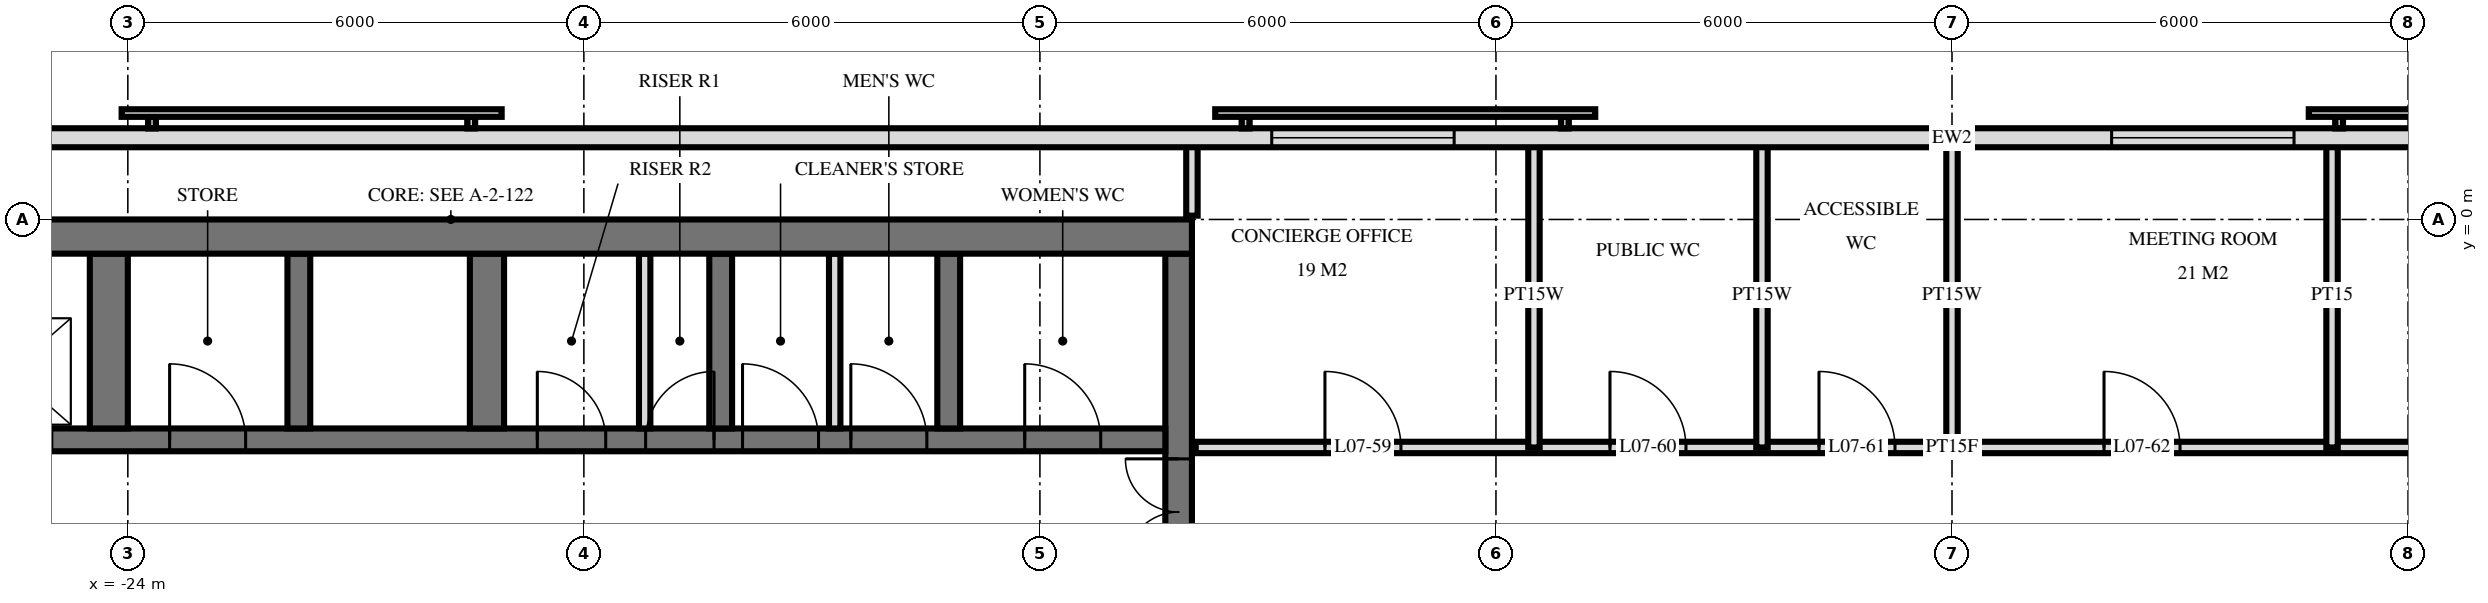
"""IFC4 building model, lengths in metres.
Left out: names, types, materials, properties, quantities, classifications, styles, units other than length and angle.
Written with IfcOpenShell. Run it as: python <this file> out.ifc"""

import sys

from ifc_helpers import new_model, si_unit, direction, frame, frame_2d, origin, place, context, subcontext, project, spatial, rectangle, extrude, element, fill, save


model = new_model("IFC4")
c1 = context("Model", 3, precision=1e-05, world=origin(), true_north=direction((0.0, 1.0)))
c2 = subcontext(c1, "Body", "Model", "MODEL_VIEW")
j1 = project(units=[si_unit("LENGTHUNIT", "METRE"), si_unit("PLANEANGLEUNIT", "RADIAN")], contexts=[c1])
p1 = place(None, origin())
s1 = spatial("IfcSite", under=j1, at=p1, CompositionType="ELEMENT")
p2 = place(p1, origin())
s2 = spatial("IfcBuilding", under=s1, at=p2, CompositionType="ELEMENT")
p3 = place(p2, frame((0.0, 0.0, 34.8)))
s3 = spatial("IfcBuildingStorey", under=s2, at=p3, CompositionType="ELEMENT", Elevation=34.8)
p4 = place(p3, frame((-29.5, -0.225, 0.0), z_axis=(0.0, 0.0, 1.0), x_axis=(1.0, 0.0, 0.0)))
e1 = element("IfcWall", 1, at=p4, inside=s3, PredefinedType="SHEAR", context=c2, shape_type="SweptSolid", body=[
    extrude(rectangle(XDim=19.5, YDim=0.45, at=frame_2d((9.75, 0.0))), origin(), (0.0, 0.0, 1.0), 3.6),
])
p5 = place(p3, frame((-10.175, -14.55, 0.0), z_axis=(0.0, 0.0, 1.0), x_axis=(0.0, 1.0, 0.0)))
e2 = element("IfcWall", 2, at=p5, inside=s3, PredefinedType="SHEAR", context=c2, shape_type="SweptSolid", body=[
    extrude(rectangle(XDim=14.1, YDim=0.35, at=frame_2d((7.05, 0.0))), origin(), (0.0, 0.0, 1.0), 3.6),
])
p6 = place(p5, frame((8.4, 0.0, 0.0)))
e3 = element("IfcOpeningElement", 3, at=p6, cuts=e2, PredefinedType="OPENING", context=c2, shape_type="SweptSolid", body=[
    extrude(rectangle(XDim=1.4, YDim=2.4, at=frame_2d((0.7, 1.2))), frame((0.0, 0.185, 0.0), z_axis=(0.0, -1.0, 0.0), x_axis=(1.0, 0.0, 0.0)), (0.0, 0.0, 1.0), 0.37),
])
p7 = place(p5, frame((10.0, 0.0, 0.0)))
e4 = element("IfcOpeningElement", 4, at=p7, cuts=e2, PredefinedType="OPENING", context=c2, shape_type="SweptSolid", body=[
    extrude(rectangle(XDim=1.4, YDim=2.4, at=frame_2d((0.7, 1.2))), frame((0.0, 0.185, 0.0), z_axis=(0.0, -1.0, 0.0), x_axis=(1.0, 0.0, 0.0)), (0.0, 0.0, 1.0), 0.37),
])
p8 = place(p5, frame((4.0, 0.0, 0.0)))
e5 = element("IfcOpeningElement", 5, at=p8, cuts=e2, PredefinedType="OPENING", context=c2, shape_type="SweptSolid", body=[
    extrude(rectangle(XDim=1.2, YDim=2.1, at=frame_2d((0.6, 1.05))), frame((0.0, 0.185, 0.0), z_axis=(0.0, -1.0, 0.0), x_axis=(1.0, 0.0, 0.0)), (0.0, 0.0, 1.0), 0.37),
])
p9 = place(p3, frame((-29.05, -2.9, 0.0), z_axis=(0.0, 0.0, 1.0), x_axis=(1.0, 0.0, 0.0)))
e6 = element("IfcWall", 6, at=p9, inside=s3, PredefinedType="SHEAR", context=c2, shape_type="SweptSolid", body=[
    extrude(rectangle(XDim=18.7, YDim=0.3, at=frame_2d((9.35, 0.0))), origin(), (0.0, 0.0, 1.0), 3.6),
])
p10 = place(p9, frame((2.95, 0.0, 0.0)))
e7 = element("IfcOpeningElement", 7, at=p10, cuts=e6, PredefinedType="OPENING", context=c2, shape_type="SweptSolid", body=[
    extrude(rectangle(XDim=1.1, YDim=2.1, at=frame_2d((0.55, 1.05))), frame((0.0, 0.16, 0.0), z_axis=(0.0, -1.0, 0.0), x_axis=(1.0, 0.0, 0.0)), (0.0, 0.0, 1.0), 0.32),
])
p11 = place(p9, frame((0.55, 0.0, 0.0)))
e8 = element("IfcOpeningElement", 8, at=p11, cuts=e6, PredefinedType="OPENING", context=c2, shape_type="SweptSolid", body=[
    extrude(rectangle(XDim=1.1, YDim=2.1, at=frame_2d((0.55, 1.05))), frame((0.0, 0.16, 0.0), z_axis=(0.0, -1.0, 0.0), x_axis=(1.0, 0.0, 0.0)), (0.0, 0.0, 1.0), 0.32),
])
p12 = place(p9, frame((11.863, 0.0, 0.0)))
e9 = element("IfcOpeningElement", 9, at=p12, cuts=e6, PredefinedType="OPENING", context=c2, shape_type="SweptSolid", body=[
    extrude(rectangle(XDim=0.9, YDim=2.1, at=frame_2d((0.45, 1.05))), frame((0.0, 0.16, 0.0), z_axis=(0.0, -1.0, 0.0), x_axis=(1.0, 0.0, 0.0)), (0.0, 0.0, 1.0), 0.32),
])
p13 = place(p9, frame((10.438, 0.0, 0.0)))
e10 = element("IfcOpeningElement", 10, at=p13, cuts=e6, PredefinedType="OPENING", context=c2, shape_type="SweptSolid", body=[
    extrude(rectangle(XDim=0.9, YDim=2.1, at=frame_2d((0.45, 1.05))), frame((0.0, 0.16, 0.0), z_axis=(0.0, -1.0, 0.0), x_axis=(1.0, 0.0, 0.0)), (0.0, 0.0, 1.0), 0.32),
])
p14 = place(p9, frame((16.85, 0.0, 0.0)))
e11 = element("IfcOpeningElement", 11, at=p14, cuts=e6, PredefinedType="OPENING", context=c2, shape_type="SweptSolid", body=[
    extrude(rectangle(XDim=1.0, YDim=2.1, at=frame_2d((0.5, 1.05))), frame((0.0, 0.16, 0.0), z_axis=(0.0, -1.0, 0.0), x_axis=(1.0, 0.0, 0.0)), (0.0, 0.0, 1.0), 0.32),
])
p15 = place(p9, frame((14.562, 0.0, 0.0)))
e12 = element("IfcOpeningElement", 12, at=p15, cuts=e6, PredefinedType="OPENING", context=c2, shape_type="SweptSolid", body=[
    extrude(rectangle(XDim=1.0, YDim=2.1, at=frame_2d((0.5, 1.05))), frame((0.0, 0.16, 0.0), z_axis=(0.0, -1.0, 0.0), x_axis=(1.0, 0.0, 0.0)), (0.0, 0.0, 1.0), 0.32),
])
p16 = place(p9, frame((13.137, 0.0, 0.0)))
e13 = element("IfcOpeningElement", 13, at=p16, cuts=e6, PredefinedType="OPENING", context=c2, shape_type="SweptSolid", body=[
    extrude(rectangle(XDim=1.0, YDim=2.1, at=frame_2d((0.5, 1.05))), frame((0.0, 0.16, 0.0), z_axis=(0.0, -1.0, 0.0), x_axis=(1.0, 0.0, 0.0)), (0.0, 0.0, 1.0), 0.32),
])
p17 = place(p9, frame((5.6, 0.0, 0.0)))
e14 = element("IfcOpeningElement", 14, at=p17, cuts=e6, PredefinedType="OPENING", context=c2, shape_type="SweptSolid", body=[
    extrude(rectangle(XDim=1.0, YDim=2.1, at=frame_2d((0.5, 1.05))), frame((0.0, 0.16, 0.0), z_axis=(0.0, -1.0, 0.0), x_axis=(1.0, 0.0, 0.0)), (0.0, 0.0, 1.0), 0.32),
])
for number, where, z_axis, x_axis in (
    (15, (-13.2, -2.75, 0.0), (0.0, 0.0, 1.0), (0.0, 1.0, 0.0)),
    (16, (-16.2, -2.75, 0.0), (0.0, 0.0, 1.0), (0.0, 1.0, 0.0)),
):
    element("IfcWall", number, at=place(p3, frame(where, z_axis=z_axis, x_axis=x_axis)), inside=s3, PredefinedType="SHEAR", context=c2, shape_type="SweptSolid", body=[
        extrude(rectangle(XDim=2.3, YDim=0.3, at=frame_2d((1.15, 0.0))), origin(), (0.0, 0.0, 1.0), 3.6),
    ])
p18 = place(p3, frame((-19.275, -2.75, 0.0), z_axis=(0.0, 0.0, 1.0), x_axis=(0.0, 1.0, 0.0)))
e17 = element("IfcWall", 17, at=p18, inside=s3, PredefinedType="SHEAR", context=c2, shape_type="SweptSolid", body=[
    extrude(rectangle(XDim=2.3, YDim=0.45, at=frame_2d((1.15, 0.0))), origin(), (0.0, 0.0, 1.0), 3.6),
])
p19 = place(p3, frame((-21.75, -2.75, 0.0), z_axis=(0.0, 0.0, 1.0), x_axis=(0.0, 1.0, 0.0)))
e18 = element("IfcWall", 18, at=p19, inside=s3, PredefinedType="SHEAR", context=c2, shape_type="SweptSolid", body=[
    extrude(rectangle(XDim=2.3, YDim=0.3, at=frame_2d((1.15, 0.0))), origin(), (0.0, 0.0, 1.0), 3.6),
])
p20 = place(p3, frame((-24.25, -2.75, 0.0), z_axis=(0.0, 0.0, 1.0), x_axis=(0.0, 1.0, 0.0)))
e19 = element("IfcWall", 19, at=p20, inside=s3, PredefinedType="SHEAR", context=c2, shape_type="SweptSolid", body=[
    extrude(rectangle(XDim=2.3, YDim=0.5, at=frame_2d((1.15, 0.0))), origin(), (0.0, 0.0, 1.0), 3.6),
])
p21 = place(p3, frame((28.775, 1.075, 0.0), z_axis=(0.0, 0.0, 1.0), x_axis=(-1.0, 0.0, 0.0)))
e20 = element("IfcWall", 20, at=p21, inside=s3, PredefinedType="SOLIDWALL", context=c2, shape_type="SweptSolid", body=[
    extrude(rectangle(XDim=57.551, YDim=0.25, at=frame_2d((28.775, 0.0))), origin(), (0.0, 0.0, 1.0), 3.32),
])
p22 = place(p21, frame((24.275, 0.0, 0.3)))
e21 = element("IfcOpeningElement", 21, at=p22, cuts=e20, PredefinedType="OPENING", context=c2, shape_type="SweptSolid", body=[
    extrude(rectangle(XDim=2.4, YDim=2.1, at=frame_2d((1.2, 1.05))), frame((0.0, 0.135, 0.0), z_axis=(0.0, -1.0, 0.0), x_axis=(1.0, 0.0, 0.0)), (0.0, 0.0, 1.0), 0.27),
])
p23 = place(p21, frame((35.325, 0.0, 0.3)))
e22 = element("IfcOpeningElement", 22, at=p23, cuts=e20, PredefinedType="OPENING", context=c2, shape_type="SweptSolid", body=[
    extrude(rectangle(XDim=2.4, YDim=2.1, at=frame_2d((1.2, 1.05))), frame((0.0, 0.135, 0.0), z_axis=(0.0, -1.0, 0.0), x_axis=(1.0, 0.0, 0.0)), (0.0, 0.0, 1.0), 0.27),
])
for number, where, z_axis, x_axis in (
    (23, (-17.2, -2.75, 0.0), (0.0, 0.0, 1.0), (0.0, 1.0, 0.0)),
    (24, (-14.7, -2.75, 0.0), (0.0, 0.0, 1.0), (0.0, 1.0, 0.0)),
):
    element("IfcWall", number, at=place(p3, frame(where, z_axis=z_axis, x_axis=x_axis)), inside=s3, PredefinedType="PARTITIONING", context=c2, shape_type="SweptSolid", body=[
        extrude(rectangle(XDim=2.3, YDim=0.15, at=frame_2d((1.15, 0.0))), origin(), (0.0, 0.0, 1.0), 3.3),
    ])
p24 = place(p3, frame((5.0, -3.0, 0.0), z_axis=(0.0, 0.0, 1.0), x_axis=(0.0, 1.0, 0.0)))
e25 = element("IfcWall", 25, at=p24, inside=s3, PredefinedType="PARTITIONING", context=c2, shape_type="SweptSolid", body=[
    extrude(rectangle(XDim=4.02, YDim=0.15, at=frame_2d((2.01, 0.0))), origin(), (0.0, 0.0, 1.0), 3.32),
])
for number, where, z_axis, x_axis in (
    (26, (0.0, -3.0, 0.0), (0.0, 0.0, 1.0), (0.0, 1.0, 0.0)),
    (27, (-2.5, -3.0, 0.0), (0.0, 0.0, 1.0), (0.0, 1.0, 0.0)),
    (28, (-5.5, -3.0, 0.0), (0.0, 0.0, 1.0), (0.0, 1.0, 0.0)),
):
    element("IfcWall", number, at=place(p3, frame(where, z_axis=z_axis, x_axis=x_axis)), inside=s3, PredefinedType="PLUMBINGWALL", context=c2, shape_type="SweptSolid", body=[
        extrude(rectangle(XDim=4.02, YDim=0.15, at=frame_2d((2.01, 0.0))), origin(), (0.0, 0.0, 1.0), 3.32),
    ])
p25 = place(p3, frame((-10.0, 0.05, 0.0), z_axis=(0.0, 0.0, 1.0), x_axis=(0.0, 1.0, 0.0)))
e29 = element("IfcWall", 29, at=p25, inside=s3, PredefinedType="PARTITIONING", context=c2, shape_type="SweptSolid", body=[
    extrude(rectangle(XDim=0.97, YDim=0.15, at=frame_2d((0.485, 0.0))), origin(), (0.0, 0.0, 1.0), 3.32),
])
p26 = place(p3, frame((-9.95, -3.0, 0.0), z_axis=(0.0, 0.0, 1.0), x_axis=(1.0, 0.0, 0.0)))
e30 = element("IfcWall", 30, at=p26, inside=s3, PredefinedType="PARTITIONING", context=c2, shape_type="SweptSolid", body=[
    extrude(rectangle(XDim=19.9, YDim=0.15, at=frame_2d((9.95, 0.0))), origin(), (0.0, 0.0, 1.0), 3.32),
])
p27 = place(p26, frame((1.7, 0.0, 0.0)))
e31 = element("IfcOpeningElement", 31, at=p27, cuts=e30, PredefinedType="OPENING", context=c2, shape_type="SweptSolid", body=[
    extrude(rectangle(XDim=1.0, YDim=2.1, at=frame_2d((0.5, 1.05))), frame((0.0, 0.085, 0.0), z_axis=(0.0, -1.0, 0.0), x_axis=(1.0, 0.0, 0.0)), (0.0, 0.0, 1.0), 0.17),
])
p28 = place(p26, frame((5.45, 0.0, 0.0)))
e32 = element("IfcOpeningElement", 32, at=p28, cuts=e30, PredefinedType="OPENING", context=c2, shape_type="SweptSolid", body=[
    extrude(rectangle(XDim=1.0, YDim=2.1, at=frame_2d((0.5, 1.05))), frame((0.0, 0.085, 0.0), z_axis=(0.0, -1.0, 0.0), x_axis=(1.0, 0.0, 0.0)), (0.0, 0.0, 1.0), 0.17),
])
p29 = place(p26, frame((8.2, 0.0, 0.0)))
e33 = element("IfcOpeningElement", 33, at=p29, cuts=e30, PredefinedType="OPENING", context=c2, shape_type="SweptSolid", body=[
    extrude(rectangle(XDim=1.0, YDim=2.1, at=frame_2d((0.5, 1.05))), frame((0.0, 0.085, 0.0), z_axis=(0.0, -1.0, 0.0), x_axis=(1.0, 0.0, 0.0)), (0.0, 0.0, 1.0), 0.17),
])
p30 = place(p26, frame((11.95, 0.0, 0.0)))
e34 = element("IfcOpeningElement", 34, at=p30, cuts=e30, PredefinedType="OPENING", context=c2, shape_type="SweptSolid", body=[
    extrude(rectangle(XDim=1.0, YDim=2.1, at=frame_2d((0.5, 1.05))), frame((0.0, 0.085, 0.0), z_axis=(0.0, -1.0, 0.0), x_axis=(1.0, 0.0, 0.0)), (0.0, 0.0, 1.0), 0.17),
])
p31 = place(p26, frame((16.95, 0.0, 0.0)))
e35 = element("IfcOpeningElement", 35, at=p31, cuts=e30, PredefinedType="OPENING", context=c2, shape_type="SweptSolid", body=[
    extrude(rectangle(XDim=1.0, YDim=2.1, at=frame_2d((0.5, 1.05))), frame((0.0, 0.085, 0.0), z_axis=(0.0, -1.0, 0.0), x_axis=(1.0, 0.0, 0.0)), (0.0, 0.0, 1.0), 0.17),
])
p32 = place(p22, origin())
e36 = element("IfcWindow", 36, at=p32, inside=s3, PartitioningType="SINGLE_PANEL", PredefinedType="WINDOW", context=c2, shape_type="SweptSolid", body=[
    extrude(rectangle(XDim=2.4, YDim=2.1, at=frame_2d((1.2, 1.05))), frame((0.0, 0.03, 0.0), z_axis=(0.0, -1.0, 0.0), x_axis=(1.0, 0.0, 0.0)), (0.0, 0.0, 1.0), 0.06),
])
fill(e21, e36)
p33 = place(p23, origin())
e37 = element("IfcWindow", 37, at=p33, inside=s3, PartitioningType="SINGLE_PANEL", PredefinedType="WINDOW", context=c2, shape_type="SweptSolid", body=[
    extrude(rectangle(XDim=2.4, YDim=2.1, at=frame_2d((1.2, 1.05))), frame((0.0, 0.03, 0.0), z_axis=(0.0, -1.0, 0.0), x_axis=(1.0, 0.0, 0.0)), (0.0, 0.0, 1.0), 0.06),
])
fill(e22, e37)
p34 = place(p7, origin())
e38 = element("IfcDoor", 38, at=p34, inside=s3, OperationType="DOUBLE_DOOR_SINGLE_SWING", PredefinedType="DOOR", context=c2, shape_type="SweptSolid", body=[
    extrude(rectangle(XDim=1.4, YDim=2.4, at=frame_2d((0.7, 1.2))), frame((0.0, 0.025, 0.0), z_axis=(0.0, -1.0, 0.0), x_axis=(1.0, 0.0, 0.0)), (0.0, 0.0, 1.0), 0.05),
])
fill(e4, e38)
p35 = place(p12, origin())
e39 = element("IfcDoor", 39, at=p35, inside=s3, OperationType="SINGLE_SWING_LEFT", PredefinedType="DOOR", context=c2, shape_type="SweptSolid", body=[
    extrude(rectangle(XDim=0.9, YDim=2.1, at=frame_2d((0.45, 1.05))), frame((0.0, 0.025, 0.0), z_axis=(0.0, -1.0, 0.0), x_axis=(1.0, 0.0, 0.0)), (0.0, 0.0, 1.0), 0.05),
])
fill(e9, e39)
p36 = place(p13, origin())
e40 = element("IfcDoor", 40, at=p36, inside=s3, OperationType="SINGLE_SWING_RIGHT", PredefinedType="DOOR", context=c2, shape_type="SweptSolid", body=[
    extrude(rectangle(XDim=0.9, YDim=2.1, at=frame_2d((0.45, 1.05))), frame((0.0, 0.025, 0.0), z_axis=(0.0, -1.0, 0.0), x_axis=(1.0, 0.0, 0.0)), (0.0, 0.0, 1.0), 0.05),
])
fill(e10, e40)
p37 = place(p14, origin())
e41 = element("IfcDoor", 41, at=p37, inside=s3, OperationType="SINGLE_SWING_RIGHT", PredefinedType="DOOR", context=c2, shape_type="SweptSolid", body=[
    extrude(rectangle(XDim=1.0, YDim=2.1, at=frame_2d((0.5, 1.05))), frame((0.0, 0.025, 0.0), z_axis=(0.0, -1.0, 0.0), x_axis=(1.0, 0.0, 0.0)), (0.0, 0.0, 1.0), 0.05),
])
fill(e11, e41)
p38 = place(p15, origin())
e42 = element("IfcDoor", 42, at=p38, inside=s3, OperationType="SINGLE_SWING_RIGHT", PredefinedType="DOOR", context=c2, shape_type="SweptSolid", body=[
    extrude(rectangle(XDim=1.0, YDim=2.1, at=frame_2d((0.5, 1.05))), frame((0.0, 0.025, 0.0), z_axis=(0.0, -1.0, 0.0), x_axis=(1.0, 0.0, 0.0)), (0.0, 0.0, 1.0), 0.05),
])
fill(e12, e42)
p39 = place(p16, origin())
e43 = element("IfcDoor", 43, at=p39, inside=s3, OperationType="SINGLE_SWING_RIGHT", PredefinedType="DOOR", context=c2, shape_type="SweptSolid", body=[
    extrude(rectangle(XDim=1.0, YDim=2.1, at=frame_2d((0.5, 1.05))), frame((0.0, 0.025, 0.0), z_axis=(0.0, -1.0, 0.0), x_axis=(1.0, 0.0, 0.0)), (0.0, 0.0, 1.0), 0.05),
])
fill(e13, e43)
p40 = place(p17, origin())
e44 = element("IfcDoor", 44, at=p40, inside=s3, OperationType="SINGLE_SWING_RIGHT", PredefinedType="DOOR", context=c2, shape_type="SweptSolid", body=[
    extrude(rectangle(XDim=1.0, YDim=2.1, at=frame_2d((0.5, 1.05))), frame((0.0, 0.025, 0.0), z_axis=(0.0, -1.0, 0.0), x_axis=(1.0, 0.0, 0.0)), (0.0, 0.0, 1.0), 0.05),
])
fill(e14, e44)
p41 = place(p27, origin())
e45 = element("IfcDoor", 45, at=p41, inside=s3, OperationType="SINGLE_SWING_RIGHT", PredefinedType="DOOR", context=c2, shape_type="SweptSolid", body=[
    extrude(rectangle(XDim=1.0, YDim=2.1, at=frame_2d((0.5, 1.05))), frame((0.0, 0.025, 0.0), z_axis=(0.0, -1.0, 0.0), x_axis=(1.0, 0.0, 0.0)), (0.0, 0.0, 1.0), 0.05),
])
fill(e31, e45)
p42 = place(p28, origin())
e46 = element("IfcDoor", 46, at=p42, inside=s3, OperationType="SINGLE_SWING_RIGHT", PredefinedType="DOOR", context=c2, shape_type="SweptSolid", body=[
    extrude(rectangle(XDim=1.0, YDim=2.1, at=frame_2d((0.5, 1.05))), frame((0.0, 0.025, 0.0), z_axis=(0.0, -1.0, 0.0), x_axis=(1.0, 0.0, 0.0)), (0.0, 0.0, 1.0), 0.05),
])
fill(e32, e46)
p43 = place(p29, origin())
e47 = element("IfcDoor", 47, at=p43, inside=s3, OperationType="SINGLE_SWING_RIGHT", PredefinedType="DOOR", context=c2, shape_type="SweptSolid", body=[
    extrude(rectangle(XDim=1.0, YDim=2.1, at=frame_2d((0.5, 1.05))), frame((0.0, 0.025, 0.0), z_axis=(0.0, -1.0, 0.0), x_axis=(1.0, 0.0, 0.0)), (0.0, 0.0, 1.0), 0.05),
])
fill(e33, e47)
p44 = place(p30, origin())
e48 = element("IfcDoor", 48, at=p44, inside=s3, OperationType="SINGLE_SWING_RIGHT", PredefinedType="DOOR", context=c2, shape_type="SweptSolid", body=[
    extrude(rectangle(XDim=1.0, YDim=2.1, at=frame_2d((0.5, 1.05))), frame((0.0, 0.025, 0.0), z_axis=(0.0, -1.0, 0.0), x_axis=(1.0, 0.0, 0.0)), (0.0, 0.0, 1.0), 0.05),
])
fill(e34, e48)
save(model, sys.argv[1])
